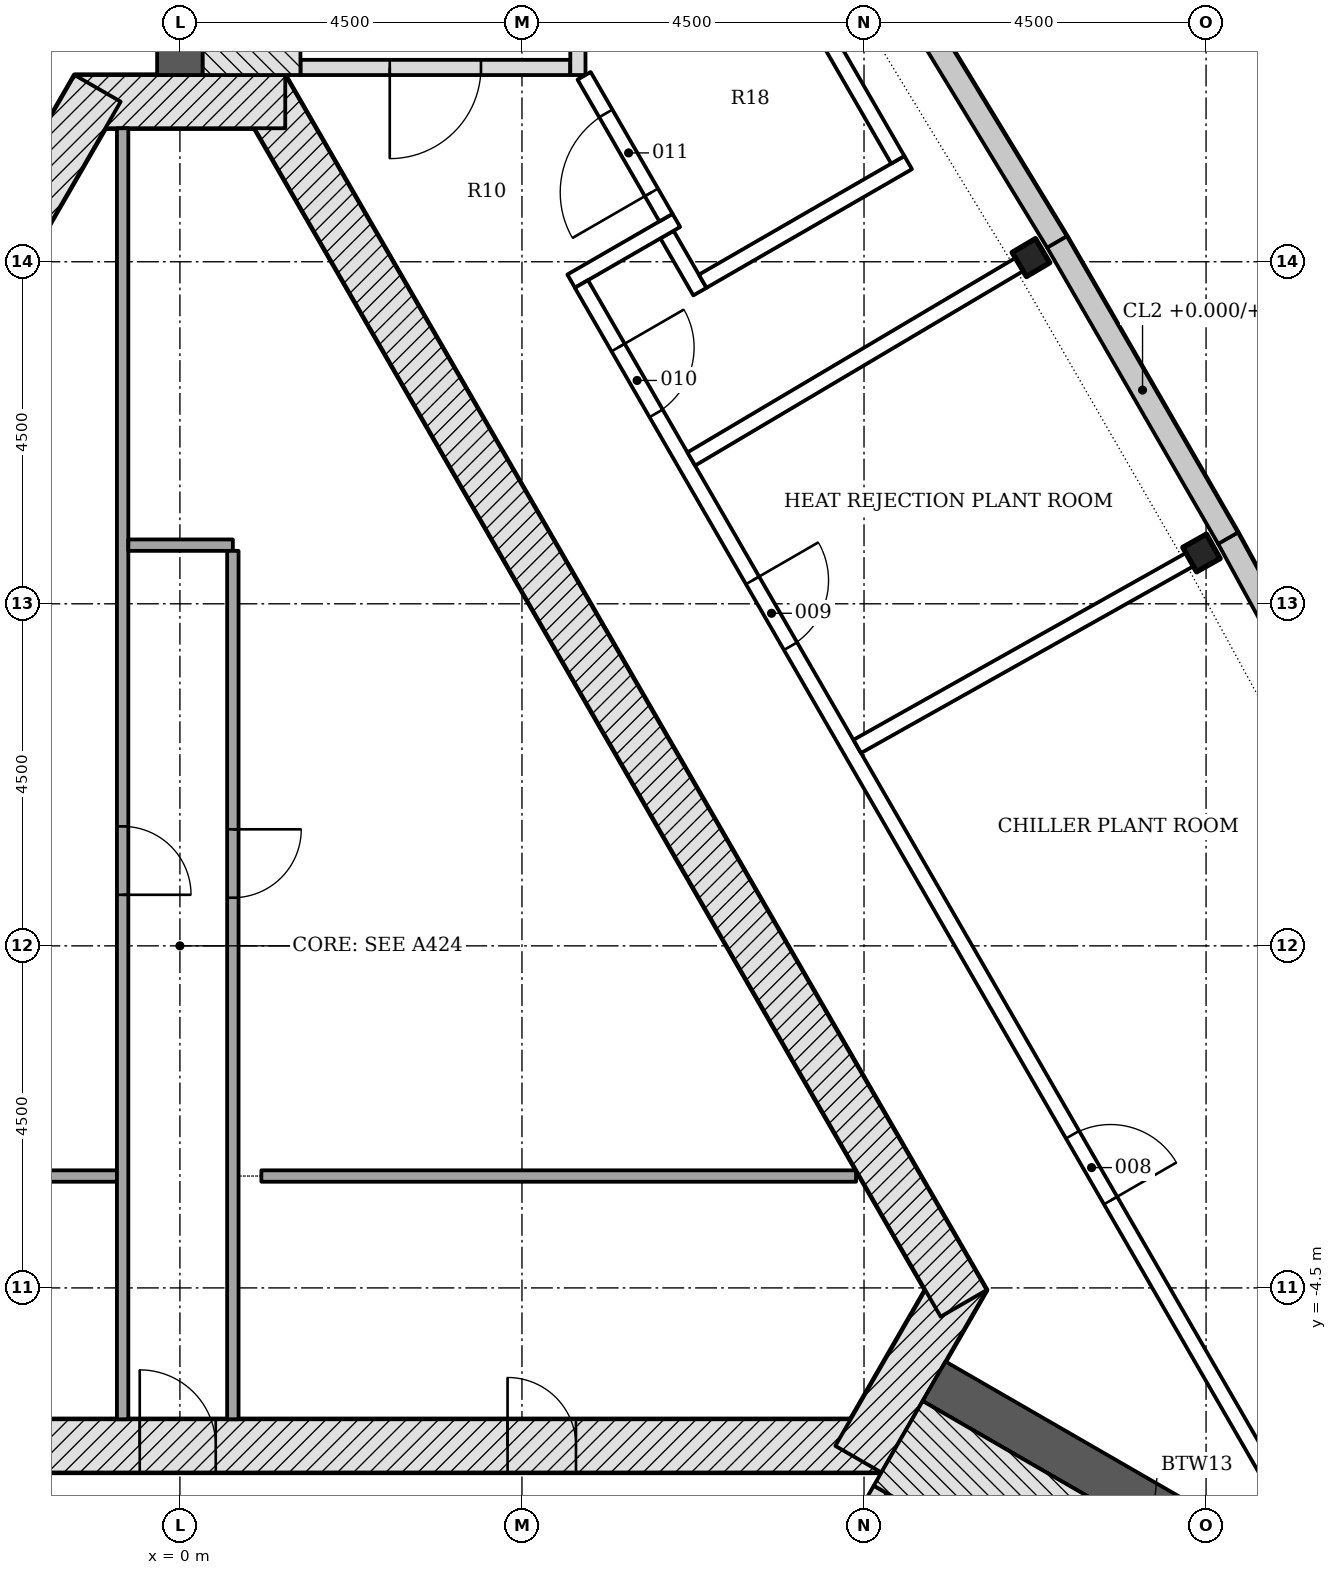
"""IFC4 building model, lengths in metres.
Left out: names, types, materials, properties, quantities, classifications, styles, units other than length and angle.
Written with IfcOpenShell. Run it as: python <this file> out.ifc"""

import sys

from ifc_helpers import new_model, si_unit, direction, frame, frame_2d, origin, origin_2d, place, context, subcontext, project, spatial, polyline, rectangle, i_section, outline, extrude, element, fill, save


model = new_model("IFC4")
c1 = context("Model", 3, precision=1e-05, world=origin(), true_north=direction((0.0, 1.0)))
c2 = subcontext(c1, "Body", "Model", "MODEL_VIEW")
j1 = project(units=[si_unit("LENGTHUNIT", "METRE"), si_unit("PLANEANGLEUNIT", "RADIAN")], contexts=[c1])
p1 = place(None, origin())
s1 = spatial("IfcSite", under=j1, at=p1, CompositionType="ELEMENT")
p2 = place(p1, origin())
s2 = spatial("IfcBuilding", under=s1, at=p2, CompositionType="ELEMENT")
p3 = place(p2, frame((0.0, 0.0, 288.6)))
s3 = spatial("IfcBuildingStorey", under=s2, at=p3, CompositionType="ELEMENT", Elevation=288.6)
p4 = place(p3, frame((-9.229, -6.578, -0.25), z_axis=(0.0, 0.0, 1.0), x_axis=(1.0, 0.0, 0.0)))
e1 = element("IfcWall", 1, at=p4, inside=s3, PredefinedType="SHEAR", context=c2, shape_type="SweptSolid", body=[
    extrude(rectangle(XDim=18.458, YDim=0.7, at=frame_2d((9.229, 0.0))), origin(), (0.0, 0.0, 1.0), 4.5),
])
p5 = place(p4, frame((8.7, 0.0, 0.25)))
e2 = element("IfcOpeningElement", 2, at=p5, cuts=e1, PredefinedType="OPENING", context=c2, shape_type="SweptSolid", body=[
    extrude(rectangle(XDim=1.0, YDim=2.1, at=frame_2d((0.5, 1.05))), frame((0.0, 0.36, 0.0), z_axis=(0.0, -1.0, 0.0), x_axis=(1.0, 0.0, 0.0)), (0.0, 0.0, 1.0), 0.72),
])
p6 = place(p4, frame((3.99, 0.0, 0.25)))
e3 = element("IfcOpeningElement", 3, at=p6, cuts=e1, PredefinedType="OPENING", context=c2, shape_type="SweptSolid", body=[
    extrude(rectangle(XDim=0.9, YDim=2.1, at=frame_2d((0.45, 1.05))), frame((0.0, 0.36, 0.0), z_axis=(0.0, -1.0, 0.0), x_axis=(1.0, 0.0, 0.0)), (0.0, 0.0, 1.0), 0.72),
])
p7 = place(p4, frame((13.539, 0.0, 0.25)))
e4 = element("IfcOpeningElement", 4, at=p7, cuts=e1, PredefinedType="OPENING", context=c2, shape_type="SweptSolid", body=[
    extrude(rectangle(XDim=0.9, YDim=2.1, at=frame_2d((0.45, 1.05))), frame((0.0, 0.36, 0.0), z_axis=(0.0, -1.0, 0.0), x_axis=(1.0, 0.0, 0.0)), (0.0, 0.0, 1.0), 0.72),
])
p8 = place(p3, frame((8.926, -6.753, -0.25), z_axis=(0.0, 0.0, 1.0), x_axis=(0.500042739161, 0.866000726912, 0.0)))
e5 = element("IfcWall", 5, at=p8, inside=s3, PredefinedType="SHEAR", context=c2, shape_type="SweptSolid", body=[
    extrude(rectangle(XDim=2.771, YDim=0.7, at=frame_2d((1.386, 0.0))), origin(), (0.0, 0.0, 1.0), 4.5),
])
p9 = place(p3, frame((10.311, -4.703, -0.25), z_axis=(0.0, 0.0, 1.0), x_axis=(-0.500001446645, 0.866024568562, 0.0)))
e6 = element("IfcWall", 6, at=p9, inside=s3, PredefinedType="SHEAR", context=c2, shape_type="SweptSolid", body=[
    extrude(rectangle(XDim=18.458, YDim=0.7, at=frame_2d((9.229, 0.0))), origin(), (0.0, 0.0, 1.0), 4.5),
])
p10 = place(p3, frame((1.386, 11.106, -0.25), z_axis=(0.0, 0.0, 1.0), x_axis=(-1.0, 0.0, 0.0)))
e7 = element("IfcWall", 7, at=p10, inside=s3, PredefinedType="SHEAR", context=c2, shape_type="SweptSolid", body=[
    extrude(rectangle(XDim=2.771, YDim=0.7, at=frame_2d((1.386, 0.0))), origin(), (0.0, 0.0, 1.0), 4.5),
])
p11 = place(p3, frame((-1.083, 11.281, -0.25), z_axis=(0.0, 0.0, 1.0), x_axis=(-0.500001446645, -0.866024568562, 0.0)))
e8 = element("IfcWall", 8, at=p11, inside=s3, PredefinedType="SHEAR", context=c2, shape_type="SweptSolid", body=[
    extrude(rectangle(XDim=18.458, YDim=0.7, at=frame_2d((9.229, 0.0))), origin(), (0.0, 0.0, 1.0), 4.5),
])
p12 = place(p11, frame((8.979, 0.0, 0.25)))
e9 = element("IfcOpeningElement", 9, at=p12, cuts=e8, PredefinedType="OPENING", context=c2, shape_type="SweptSolid", body=[
    extrude(rectangle(XDim=1.2, YDim=2.1, at=frame_2d((0.6, 1.05))), frame((0.0, 0.36, 0.0), z_axis=(0.0, -1.0, 0.0), x_axis=(1.0, 0.0, 0.0)), (0.0, 0.0, 1.0), 0.72),
])
p13 = place(p11, frame((11.029, 0.0, 0.25)))
e10 = element("IfcOpeningElement", 10, at=p13, cuts=e8, PredefinedType="OPENING", context=c2, shape_type="SweptSolid", body=[
    extrude(rectangle(XDim=1.2, YDim=2.1, at=frame_2d((0.6, 1.05))), frame((0.0, 0.36, 0.0), z_axis=(0.0, -1.0, 0.0), x_axis=(1.0, 0.0, 0.0)), (0.0, 0.0, 1.0), 0.72),
])
p14 = place(p3, frame((0.0, 11.456, -0.25), z_axis=(0.0, 0.0, 1.0), x_axis=(0.0, 1.0, 0.0)))
e11 = element("IfcWall", 11, at=p14, inside=s3, PredefinedType="SHEAR", context=c2, shape_type="SweptSolid", body=[
    extrude(rectangle(XDim=6.679, YDim=0.6, at=frame_2d((3.339, 0.0))), origin(), (0.0, 0.0, 1.0), 4.5),
])
p15 = place(p3, frame((9.922, -5.728, -0.25), z_axis=(0.0, 0.0, 1.0), x_axis=(0.866032176823, -0.499988268569, 0.0)))
e12 = element("IfcWall", 12, at=p15, inside=s3, PredefinedType="SHEAR", context=c2, shape_type="SweptSolid", body=[
    extrude(rectangle(XDim=6.678, YDim=0.6, at=frame_2d((3.339, 0.0))), origin(), (0.0, 0.0, 1.0), 4.5),
])
for number, where, z_axis, x_axis in (
    (13, (13.44, 5.169, -0.25), (0.0, 0.0, 1.0), (-0.49, 0.872, 0.0)),
    (14, (11.196, 9.055, -0.25), (0.0, 0.0, 1.0), (-0.51, 0.86, 0.0)),
):
    element("IfcColumn", number, at=place(p3, frame(where, z_axis=z_axis, x_axis=x_axis)), inside=s3, PredefinedType="COLUMN", context=c2, shape_type="SweptSolid", body=[
        extrude(i_section(OverallWidth=0.368, OverallDepth=0.356, WebThickness=0.011, FlangeThickness=0.018, FilletRadius=0.015, at=origin_2d()), origin(), (0.0, 0.0, 1.0), 4.5),
    ])
p16 = place(p3, origin())
e15 = element("IfcWall", 15, at=p16, inside=s3, PredefinedType="NOTDEFINED", context=c2, shape_type="SweptSolid", body=[
    extrude(outline(polyline([(18.145, -2.507), (16.078, 1.49), (13.919, 5.438), (13.656, 5.294), (15.813, 1.349), (17.878, -2.645), (18.145, -2.507)])), origin(), (0.0, 0.0, 1.0), 4.25),
])
p17 = place(p3, origin())
e16 = element("IfcWall", 16, at=p17, inside=s3, PredefinedType="NOTDEFINED", context=c2, shape_type="SweptSolid", body=[
    extrude(outline(polyline([(11.669, 9.335), (9.33, 13.179), (6.901, 16.968), (6.649, 16.806), (9.075, 13.02), (11.413, 9.179), (11.669, 9.335)])), origin(), (0.0, 0.0, 1.0), 4.25),
])
p18 = place(p3, origin())
e17 = element("IfcWall", 17, at=p18, inside=s3, PredefinedType="NOTDEFINED", context=c2, shape_type="SweptSolid", body=[
    extrude(outline(polyline([(13.919, 5.438), (11.669, 9.335), (11.409, 9.185), (13.659, 5.288), (13.919, 5.438)])), origin(), (0.0, 0.0, 1.0), 1.2),
])
p19 = place(p3, origin())
e18 = element("IfcWall", 18, at=p19, inside=s3, PredefinedType="NOTDEFINED", context=c2, shape_type="SweptSolid", body=[
    extrude(outline(polyline([(11.244, -14.46), (13.211, -14.336), (14.708, -14.069), (16.111, -13.485), (17.355, -12.611), (18.381, -11.49), (19.141, -10.174), (19.599, -8.724), (19.733, -7.21), (19.538, -5.703), (19.021, -4.273), (18.145, -2.507), (17.876, -2.64), (18.745, -4.391), (19.244, -5.774), (19.432, -7.216), (19.303, -8.665), (18.865, -10.052), (18.138, -11.312), (17.156, -12.385), (15.965, -13.22), (14.623, -13.779), (13.176, -14.038), (11.225, -14.161), (11.244, -14.46)])), origin(), (0.0, 0.0, 1.0), 4.25),
])
p20 = place(p3, frame((-8.895, -3.028, 0.0), z_axis=(0.0, 0.0, 1.0), x_axis=(1.0, 0.0, 0.0)))
e19 = element("IfcWall", 19, at=p20, inside=s3, PredefinedType="PARTITIONING", context=c2, shape_type="SweptSolid", body=[
    extrude(rectangle(XDim=8.066, YDim=0.15, at=frame_2d((4.033, 0.0))), origin(), (0.0, 0.0, 1.0), 4.25),
])
p21 = place(p3, frame((-0.754, 10.756, 0.0), z_axis=(0.0, 0.0, 1.0), x_axis=(0.0, -1.0, 0.0)))
e20 = element("IfcWall", 20, at=p21, inside=s3, PredefinedType="PARTITIONING", context=c2, shape_type="SweptSolid", body=[
    extrude(rectangle(XDim=16.985, YDim=0.15, at=frame_2d((8.492, 0.0))), origin(), (0.0, 0.0, 1.0), 4.25),
])
p22 = place(p21, frame((9.185, 0.0, 0.0)))
e21 = element("IfcOpeningElement", 21, at=p22, cuts=e20, PredefinedType="OPENING", context=c2, shape_type="SweptSolid", body=[
    extrude(rectangle(XDim=0.9, YDim=2.1, at=frame_2d((0.45, 1.05))), frame((0.0, 0.085, 0.0), z_axis=(0.0, -1.0, 0.0), x_axis=(1.0, 0.0, 0.0)), (0.0, 0.0, 1.0), 0.17),
])
p23 = place(p3, frame((-0.679, 5.272, 0.0), z_axis=(0.0, 0.0, 1.0), x_axis=(1.0, 0.0, 0.0)))
e22 = element("IfcWall", 22, at=p23, inside=s3, PredefinedType="PARTITIONING", context=c2, shape_type="SweptSolid", body=[
    extrude(rectangle(XDim=1.375, YDim=0.15, at=frame_2d((0.688, 0.0))), origin(), (0.0, 0.0, 1.0), 4.25),
])
p24 = place(p3, frame((0.696, 5.197, 0.0), z_axis=(0.0, 0.0, 1.0), x_axis=(0.0, -1.0, 0.0)))
e23 = element("IfcWall", 23, at=p24, inside=s3, PredefinedType="PARTITIONING", context=c2, shape_type="SweptSolid", body=[
    extrude(rectangle(XDim=11.425, YDim=0.15, at=frame_2d((5.712, 0.0))), origin(), (0.0, 0.0, 1.0), 4.25),
])
p25 = place(p24, frame((3.664, 0.0, 0.0)))
e24 = element("IfcOpeningElement", 24, at=p25, cuts=e23, PredefinedType="OPENING", context=c2, shape_type="SweptSolid", body=[
    extrude(rectangle(XDim=0.9, YDim=2.1, at=frame_2d((0.45, 1.05))), frame((0.0, 0.085, 0.0), z_axis=(0.0, -1.0, 0.0), x_axis=(1.0, 0.0, 0.0)), (0.0, 0.0, 1.0), 0.17),
])
p26 = place(p3, frame((1.071, -3.028, 0.0), z_axis=(0.0, 0.0, 1.0), x_axis=(1.0, 0.0, 0.0)))
e25 = element("IfcWall", 25, at=p26, inside=s3, PredefinedType="PARTITIONING", context=c2, shape_type="SweptSolid", body=[
    extrude(rectangle(XDim=7.824, YDim=0.15, at=frame_2d((3.912, 0.0))), origin(), (0.0, 0.0, 1.0), 4.25),
])
p27 = place(p3, frame((5.135, 11.556, -0.25), z_axis=(0.0, 0.0, 1.0), x_axis=(-1.0, 0.0, 0.0)))
e26 = element("IfcWall", 26, at=p27, inside=s3, PredefinedType="SHEAR", context=c2, shape_type="SweptSolid", body=[
    extrude(rectangle(XDim=3.55, YDim=0.2, at=frame_2d((1.775, 0.0))), origin(), (0.0, 0.0, 1.0), 4.5),
])
p28 = place(p27, frame((1.175, 0.0, 0.25)))
e27 = element("IfcOpeningElement", 27, at=p28, cuts=e26, PredefinedType="OPENING", context=c2, shape_type="SweptSolid", body=[
    extrude(rectangle(XDim=1.2, YDim=2.1, at=frame_2d((0.6, 1.05))), frame((0.0, 0.11, 0.0), z_axis=(0.0, -1.0, 0.0), x_axis=(1.0, 0.0, 0.0)), (0.0, 0.0, 1.0), 0.22),
])
p29 = place(p3, frame((5.236, 11.456, -0.25), z_axis=(0.0, 0.0, 1.0), x_axis=(0.0, 1.0, 0.0)))
e28 = element("IfcWall", 28, at=p29, inside=s3, PredefinedType="SHEAR", context=c2, shape_type="SweptSolid", body=[
    extrude(rectangle(XDim=5.6, YDim=0.2, at=frame_2d((2.8, 0.0))), origin(), (0.0, 0.0, 1.0), 4.5),
])
p30 = place(p29, frame((0.45, 0.0, 0.25)))
e29 = element("IfcOpeningElement", 29, at=p30, cuts=e28, PredefinedType="OPENING", context=c2, shape_type="SweptSolid", body=[
    extrude(rectangle(XDim=1.2, YDim=2.1, at=frame_2d((0.6, 1.05))), frame((0.0, 0.11, 0.0), z_axis=(0.0, -1.0, 0.0), x_axis=(1.0, 0.0, 0.0)), (0.0, 0.0, 1.0), 0.22),
])
p31 = place(p3, frame((0.943, 11.456, -0.25), z_axis=(0.0, 0.0, 1.0), x_axis=(0.0, 1.0, 0.0)))
e30 = element("IfcWall", 30, at=p31, inside=s3, PredefinedType="SHEAR", context=c2, shape_type="SweptSolid", body=[
    extrude(rectangle(XDim=6.679, YDim=1.286, at=frame_2d((3.339, 0.0))), origin(), (0.0, 0.0, 1.0), 4.5),
])
p32 = place(p3, frame((7.44, -10.226, -0.25), z_axis=(0.0, 0.0, 1.0), x_axis=(0.500022077904, 0.866012656725, 0.0)))
e31 = element("IfcWall", 31, at=p32, inside=s3, PredefinedType="SHEAR", context=c2, shape_type="SweptSolid", body=[
    extrude(rectangle(XDim=3.55, YDim=0.2, at=frame_2d((1.775, 0.0))), origin(), (0.0, 0.0, 1.0), 4.5),
])
p33 = place(p32, frame((1.175, 0.0, 0.25)))
e32 = element("IfcOpeningElement", 32, at=p33, cuts=e31, PredefinedType="OPENING", context=c2, shape_type="SweptSolid", body=[
    extrude(rectangle(XDim=1.2, YDim=2.1, at=frame_2d((0.6, 1.05))), frame((0.0, 0.11, 0.0), z_axis=(0.0, -1.0, 0.0), x_axis=(1.0, 0.0, 0.0)), (0.0, 0.0, 1.0), 0.22),
])
p34 = place(p3, frame((9.45, -6.545, -0.25), z_axis=(0.0, 0.0, 1.0), x_axis=(0.866016347338, -0.500015685897, 0.0)))
e33 = element("IfcWall", 33, at=p34, inside=s3, PredefinedType="SHEAR", context=c2, shape_type="SweptSolid", body=[
    extrude(rectangle(XDim=6.678, YDim=1.286, at=frame_2d((3.339, 0.0))), origin(), (0.0, 0.0, 1.0), 4.5),
])
p35 = place(p3, frame((-7.307, 5.2, 0.0), z_axis=(0.0, 0.0, 1.0), x_axis=(0.49999780173, 0.866026672953, 0.0)))
e34 = element("IfcWall", 34, at=p35, inside=s3, PredefinedType="PARTITIONING", context=c2, shape_type="SweptSolid", body=[
    extrude(rectangle(XDim=13.841, YDim=0.2, at=frame_2d((6.92, 0.0))), origin(), (0.0, 0.0, 1.0), 3.702),
])
p36 = place(p35, frame((6.454, 0.0, 0.0)))
e35 = element("IfcOpeningElement", 35, at=p36, cuts=e34, PredefinedType="OPENING", context=c2, shape_type="SweptSolid", body=[
    extrude(rectangle(XDim=1.0, YDim=2.1, at=frame_2d((0.5, 1.05))), frame((0.0, 0.11, 0.0), z_axis=(0.0, -1.0, 0.0), x_axis=(1.0, 0.0, 0.0)), (0.0, 0.0, 1.0), 0.22),
])
p37 = place(p3, frame((6.408, 9.358, 0.0), z_axis=(0.0, 0.0, 1.0), x_axis=(0.499958279983, -0.866049489508, 0.0)))
e36 = element("IfcWall", 36, at=p37, inside=s3, PredefinedType="PARTITIONING", context=c2, shape_type="SweptSolid", body=[
    extrude(rectangle(XDim=0.866, YDim=0.2, at=frame_2d((0.433, 0.0))), origin(), (0.0, 0.0, 1.0), 4.25),
])
p38 = place(p3, frame((5.147, 8.745, 0.0), z_axis=(0.0, 0.0, 1.0), x_axis=(0.865987117328, 0.500066308224, 0.0)))
e37 = element("IfcWall", 37, at=p38, inside=s3, PredefinedType="PARTITIONING", context=c2, shape_type="SweptSolid", body=[
    extrude(rectangle(XDim=1.598, YDim=0.2, at=frame_2d((0.799, 0.0))), origin(), (0.0, 0.0, 1.0), 4.25),
])
p39 = place(p3, frame((6.395, 9.581, 0.0), z_axis=(0.0, 0.0, 1.0), x_axis=(-0.500003735859, 0.866023246874, 0.0)))
e38 = element("IfcWall", 38, at=p39, inside=s3, PredefinedType="PARTITIONING", context=c2, shape_type="SweptSolid", body=[
    extrude(rectangle(XDim=2.154, YDim=0.2, at=frame_2d((1.077, 0.0))), origin(), (0.0, 0.0, 1.0), 3.702),
])
p40 = place(p39, frame((0.383, 0.0, 0.0)))
e39 = element("IfcOpeningElement", 39, at=p40, cuts=e38, PredefinedType="OPENING", context=c2, shape_type="SweptSolid", body=[
    extrude(rectangle(XDim=1.2, YDim=2.1, at=frame_2d((0.6, 1.05))), frame((0.0, 0.11, 0.0), z_axis=(0.0, -1.0, 0.0), x_axis=(1.0, 0.0, 0.0)), (0.0, 0.0, 1.0), 0.22),
])
p41 = place(p3, frame((5.282, 8.708, 0.0), z_axis=(0.0, 0.0, 1.0), x_axis=(0.500001848211, -0.866024336717, 0.0)))
e40 = element("IfcWall", 40, at=p41, inside=s3, PredefinedType="PARTITIONING", context=c2, shape_type="SweptSolid", body=[
    extrude(rectangle(XDim=19.591, YDim=0.2, at=frame_2d((9.795, 0.0))), origin(), (0.0, 0.0, 1.0), 3.702),
])
p42 = place(p41, frame((12.923, 0.0, 0.0)))
e41 = element("IfcOpeningElement", 41, at=p42, cuts=e40, PredefinedType="OPENING", context=c2, shape_type="SweptSolid", body=[
    extrude(rectangle(XDim=1.0, YDim=2.1, at=frame_2d((0.5, 1.05))), frame((0.0, 0.11, 0.0), z_axis=(0.0, -1.0, 0.0), x_axis=(1.0, 0.0, 0.0)), (0.0, 0.0, 1.0), 0.22),
])
p43 = place(p41, frame((4.502, 0.0, 0.0)))
e42 = element("IfcOpeningElement", 42, at=p43, cuts=e40, PredefinedType="OPENING", context=c2, shape_type="SweptSolid", body=[
    extrude(rectangle(XDim=1.0, YDim=2.1, at=frame_2d((0.5, 1.05))), frame((0.0, 0.11, 0.0), z_axis=(0.0, -1.0, 0.0), x_axis=(1.0, 0.0, 0.0)), (0.0, 0.0, 1.0), 0.22),
])
p44 = place(p41, frame((0.965, 0.0, 0.0)))
e43 = element("IfcOpeningElement", 43, at=p44, cuts=e40, PredefinedType="OPENING", context=c2, shape_type="SweptSolid", body=[
    extrude(rectangle(XDim=1.0, YDim=2.1, at=frame_2d((0.5, 1.05))), frame((0.0, 0.11, 0.0), z_axis=(0.0, -1.0, 0.0), x_axis=(1.0, 0.0, 0.0)), (0.0, 0.0, 1.0), 0.22),
])
for number, where, z_axis, x_axis in (
    (44, (8.911, 2.624, 0.0), (0.0, 0.0, 1.0), (0.872, 0.49, 0.0)),
    (45, (6.728, 6.406, 0.0), (0.0, 0.0, 1.0), (0.86, 0.51, 0.0)),
):
    element("IfcWall", number, at=place(p3, frame(where, z_axis=z_axis, x_axis=x_axis)), inside=s3, PredefinedType="PARTITIONING", context=c2, shape_type="SweptSolid", body=[
        extrude(rectangle(XDim=5.044, YDim=0.2, at=frame_2d((2.522, 0.0))), origin(), (0.0, 0.0, 1.0), 3.702),
    ])
p45 = place(p3, frame((6.878, 8.744, 0.0), z_axis=(0.0, 0.0, 1.0), x_axis=(0.866025387892, 0.500000027526, 0.0)))
e46 = element("IfcWall", 46, at=p45, inside=s3, PredefinedType="PARTITIONING", context=c2, shape_type="SweptSolid", body=[
    extrude(rectangle(XDim=3.122, YDim=0.2, at=frame_2d((1.561, 0.0))), origin(), (0.0, 0.0, 1.0), 4.25),
])
p46 = place(p3, frame((9.445, 10.341, 0.0), z_axis=(0.0, 0.0, 1.0), x_axis=(-0.499996461177, 0.866027446915, 0.0)))
e47 = element("IfcWall", 47, at=p46, inside=s3, PredefinedType="PARTITIONING", context=c2, shape_type="SweptSolid", body=[
    extrude(rectangle(XDim=5.759, YDim=0.2, at=frame_2d((2.879, 0.0))), origin(), (0.0, 0.0, 1.0), 3.702),
])
p47 = place(p5, origin())
e48 = element("IfcDoor", 48, at=p47, inside=s3, OperationType="SINGLE_SWING_LEFT", PredefinedType="DOOR", context=c2, shape_type="SweptSolid", body=[
    extrude(rectangle(XDim=1.0, YDim=2.1, at=frame_2d((0.5, 1.05))), frame((0.0, 0.075, 0.0), z_axis=(0.0, -1.0, 0.0), x_axis=(1.0, 0.0, 0.0)), (0.0, 0.0, 1.0), 0.15),
])
fill(e2, e48)
p48 = place(p7, origin())
e49 = element("IfcDoor", 49, at=p48, inside=s3, OperationType="SINGLE_SWING_LEFT", PredefinedType="DOOR", context=c2, shape_type="SweptSolid", body=[
    extrude(rectangle(XDim=0.9, YDim=2.1, at=frame_2d((0.45, 1.05))), frame((0.0, 0.075, 0.0), z_axis=(0.0, -1.0, 0.0), x_axis=(1.0, 0.0, 0.0)), (0.0, 0.0, 1.0), 0.15),
])
fill(e4, e49)
p49 = place(p22, origin())
e50 = element("IfcDoor", 50, at=p49, inside=s3, OperationType="SINGLE_SWING_RIGHT", PredefinedType="DOOR", context=c2, shape_type="SweptSolid", body=[
    extrude(rectangle(XDim=0.9, YDim=2.1, at=frame_2d((0.45, 1.05))), frame((0.0, 0.025, 0.0), z_axis=(0.0, -1.0, 0.0), x_axis=(1.0, 0.0, 0.0)), (0.0, 0.0, 1.0), 0.05),
])
fill(e21, e50)
p50 = place(p25, origin())
e51 = element("IfcDoor", 51, at=p50, inside=s3, OperationType="SINGLE_SWING_LEFT", PredefinedType="DOOR", context=c2, shape_type="SweptSolid", body=[
    extrude(rectangle(XDim=0.9, YDim=2.1, at=frame_2d((0.45, 1.05))), frame((0.0, 0.025, 0.0), z_axis=(0.0, -1.0, 0.0), x_axis=(1.0, 0.0, 0.0)), (0.0, 0.0, 1.0), 0.05),
])
fill(e24, e51)
p51 = place(p28, origin())
e52 = element("IfcDoor", 52, at=p51, inside=s3, OperationType="SINGLE_SWING_RIGHT", PredefinedType="DOOR", context=c2, shape_type="SweptSolid", body=[
    extrude(rectangle(XDim=1.2, YDim=2.1, at=frame_2d((0.6, 1.05))), frame((0.0, 0.025, 0.0), z_axis=(0.0, -1.0, 0.0), x_axis=(1.0, 0.0, 0.0)), (0.0, 0.0, 1.0), 0.05),
])
fill(e27, e52)
p52 = place(p42, origin())
e53 = element("IfcDoor", 53, at=p52, inside=s3, OperationType="SINGLE_SWING_RIGHT", PredefinedType="DOOR", context=c2, shape_type="SweptSolid", body=[
    extrude(rectangle(XDim=1.0, YDim=2.1, at=frame_2d((0.5, 1.05))), frame((0.0, 0.025, 0.0), z_axis=(0.0, -1.0, 0.0), x_axis=(1.0, 0.0, 0.0)), (0.0, 0.0, 1.0), 0.05),
])
fill(e41, e53)
p53 = place(p43, origin())
e54 = element("IfcDoor", 54, at=p53, inside=s3, OperationType="SINGLE_SWING_LEFT", PredefinedType="DOOR", context=c2, shape_type="SweptSolid", body=[
    extrude(rectangle(XDim=1.0, YDim=2.1, at=frame_2d((0.5, 1.05))), frame((0.0, 0.025, 0.0), z_axis=(0.0, -1.0, 0.0), x_axis=(1.0, 0.0, 0.0)), (0.0, 0.0, 1.0), 0.05),
])
fill(e42, e54)
p54 = place(p44, origin())
e55 = element("IfcDoor", 55, at=p54, inside=s3, OperationType="SINGLE_SWING_LEFT", PredefinedType="DOOR", context=c2, shape_type="SweptSolid", body=[
    extrude(rectangle(XDim=1.0, YDim=2.1, at=frame_2d((0.5, 1.05))), frame((0.0, 0.025, 0.0), z_axis=(0.0, -1.0, 0.0), x_axis=(1.0, 0.0, 0.0)), (0.0, 0.0, 1.0), 0.05),
])
fill(e43, e55)
p55 = place(p40, origin())
e56 = element("IfcDoor", 56, at=p55, inside=s3, OperationType="SINGLE_SWING_LEFT", PredefinedType="DOOR", context=c2, shape_type="SweptSolid", body=[
    extrude(rectangle(XDim=1.2, YDim=2.1, at=frame_2d((0.6, 1.05))), frame((0.0, 0.025, 0.0), z_axis=(0.0, -1.0, 0.0), x_axis=(1.0, 0.0, 0.0)), (0.0, 0.0, 1.0), 0.05),
])
fill(e39, e56)
save(model, sys.argv[1])
